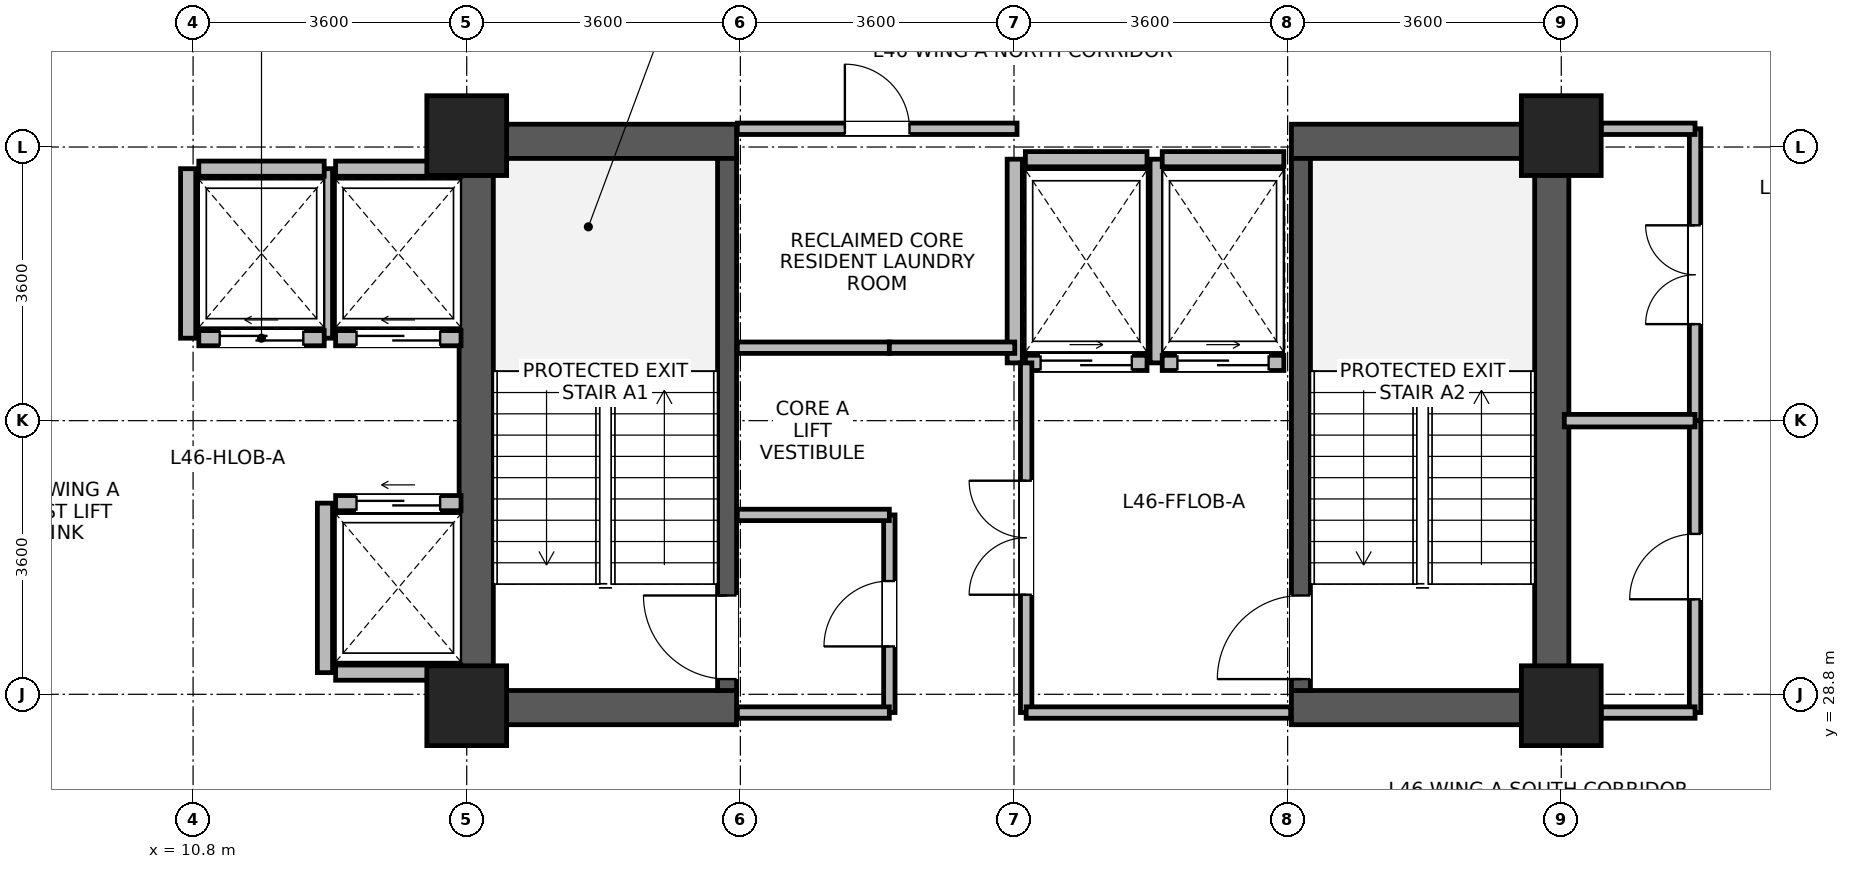
"""IFC4 building model, lengths in metres.
Left out: names, types, materials, properties, quantities, classifications, styles, units other than length and angle.
Written with IfcOpenShell. Run it as: python <this file> out.ifc"""

import sys

from ifc_helpers import new_model, si_unit, direction, frame, frame_2d, origin, origin_2d, place, context, subcontext, project, spatial, rectangle, extrude, source, transform, mapped, element, fill, save


model = new_model("IFC4")
c1 = context("Model", 3, precision=1e-05, world=origin(), true_north=direction((0.0, 1.0)))
c2 = subcontext(c1, "Body", "Model", "MODEL_VIEW")
j1 = project(units=[si_unit("LENGTHUNIT", "METRE"), si_unit("PLANEANGLEUNIT", "RADIAN")], contexts=[c1])
p1 = place(None, origin())
s1 = spatial("IfcSite", under=j1, at=p1, CompositionType="ELEMENT")
p2 = place(p1, origin())
s2 = spatial("IfcBuilding", under=s1, at=p2, CompositionType="ELEMENT")
p3 = place(p2, frame((0.0, 0.0, 180.9)))
s3 = spatial("IfcBuildingStorey", under=s2, at=p3, CompositionType="ELEMENT", Elevation=180.9)
for number, where, z_axis, x_axis in (
    (1, (14.525, 28.4, 0.0), (0.0, 0.0, 1.0), (0.0, 1.0, 0.0)),
    (2, (28.675, 28.4, 0.0), (0.0, 0.0, 1.0), (0.0, 1.0, 0.0)),
):
    element("IfcWall", number, at=place(p3, frame(where, z_axis=z_axis, x_axis=x_axis)), inside=s3, PredefinedType="SHEAR", context=c2, shape_type="SweptSolid", body=[
        extrude(rectangle(XDim=7.9, YDim=0.45, at=frame_2d((3.95, 0.0))), origin(), (0.0, 0.0, 1.0), 3.46),
    ])
for number, where, z_axis, x_axis in (
    (3, (14.75, 28.625, 0.0), (0.0, 0.0, 1.0), (1.0, 0.0, 0.0)),
    (4, (25.25, 28.625, 0.0), (0.0, 0.0, 1.0), (1.0, 0.0, 0.0)),
    (5, (14.75, 36.075, 0.0), (0.0, 0.0, 1.0), (1.0, 0.0, 0.0)),
    (6, (25.25, 36.075, 0.0), (0.0, 0.0, 1.0), (1.0, 0.0, 0.0)),
):
    element("IfcWall", number, at=place(p3, frame(where, z_axis=z_axis, x_axis=x_axis)), inside=s3, PredefinedType="SHEAR", context=c2, shape_type="SweptSolid", body=[
        extrude(rectangle(XDim=3.2, YDim=0.45, at=frame_2d((1.6, 0.0))), origin(), (0.0, 0.0, 1.0), 3.46),
    ])
p4 = place(p3, frame((17.825, 28.85, 0.0), z_axis=(0.0, 0.0, 1.0), x_axis=(0.0, 1.0, 0.0)))
e7 = element("IfcWall", 7, at=p4, inside=s3, PredefinedType="SHEAR", context=c2, shape_type="SweptSolid", body=[
    extrude(rectangle(XDim=7.0, YDim=0.25, at=frame_2d((3.5, 0.0))), origin(), (0.0, 0.0, 1.0), 3.46),
])
p5 = place(p4, frame((0.15, 0.0, 0.0)))
e8 = element("IfcOpeningElement", 8, at=p5, cuts=e7, PredefinedType="OPENING", context=c2, shape_type="SweptSolid", body=[
    extrude(rectangle(XDim=1.1, YDim=2.08, at=frame_2d((0.55, 1.04))), frame((0.0, 0.135, 0.0), z_axis=(0.0, -1.0, 0.0), x_axis=(1.0, 0.0, 0.0)), (0.0, 0.0, 1.0), 0.27),
])
p6 = place(p3, frame((25.375, 28.85, 0.0), z_axis=(0.0, 0.0, 1.0), x_axis=(0.0, 1.0, 0.0)))
e9 = element("IfcWall", 9, at=p6, inside=s3, PredefinedType="SHEAR", context=c2, shape_type="SweptSolid", body=[
    extrude(rectangle(XDim=7.0, YDim=0.25, at=frame_2d((3.5, 0.0))), origin(), (0.0, 0.0, 1.0), 3.46),
])
p7 = place(p6, frame((0.15, 0.0, 0.0)))
e10 = element("IfcOpeningElement", 10, at=p7, cuts=e9, PredefinedType="OPENING", context=c2, shape_type="SweptSolid", body=[
    extrude(rectangle(XDim=1.1, YDim=2.08, at=frame_2d((0.55, 1.04))), frame((0.0, 0.135, 0.0), z_axis=(0.0, -1.0, 0.0), x_axis=(1.0, 0.0, 0.0)), (0.0, 0.0, 1.0), 0.27),
])
m1 = source(origin(), c2, "Body", "SweptSolid", [
    extrude(rectangle(XDim=1.05, YDim=1.05, at=origin_2d()), origin(), (0.0, 0.0, 1.0), 3.7),
])
for number, where, z_axis, x_axis in (
    (11, (14.4, 28.65, 0.0), (0.0, 0.0, 1.0), (1.0, 0.0, 0.0)),
    (12, (14.4, 36.15, 0.0), (0.0, 0.0, 1.0), (1.0, 0.0, 0.0)),
    (13, (28.8, 28.65, 0.0), (0.0, 0.0, 1.0), (1.0, 0.0, 0.0)),
    (14, (28.8, 36.15, 0.0), (0.0, 0.0, 1.0), (1.0, 0.0, 0.0)),
):
    element("IfcColumn", number, at=place(p3, frame(where, z_axis=z_axis, x_axis=x_axis)), inside=s3, PredefinedType="COLUMN", context=c2, shape_type="MappedRepresentation", body=[
        mapped(m1, transform((0.0, 0.0, 0.0), x_axis=(1.0, 0.0, 0.0), y_axis=(0.0, 1.0, 0.0), z_axis=(0.0, 0.0, 1.0), scale=1.0)),
    ])
p8 = place(p3, frame((12.675, 33.485, 0.0), z_axis=(0.0, 0.0, 1.0), x_axis=(1.0, 0.0, 0.0)))
e15 = element("IfcWall", 15, at=p8, inside=s3, PredefinedType="PARTITIONING", context=c2, shape_type="SweptSolid", body=[
    extrude(rectangle(XDim=1.65, YDim=0.2, at=frame_2d((0.825, 0.0))), origin(), (0.0, 0.0, 1.0), 3.44),
])
p9 = place(p8, frame((0.275, 0.0, 0.0)))
e16 = element("IfcOpeningElement", 16, at=p9, cuts=e15, PredefinedType="OPENING", context=c2, shape_type="SweptSolid", body=[
    extrude(rectangle(XDim=1.1, YDim=2.12, at=frame_2d((0.55, 1.06))), frame((0.0, 0.11, 0.0), z_axis=(0.0, -1.0, 0.0), x_axis=(1.0, 0.0, 0.0)), (0.0, 0.0, 1.0), 0.22),
])
p10 = place(p3, frame((12.675, 35.715, 0.0), z_axis=(0.0, 0.0, 1.0), x_axis=(1.0, 0.0, 0.0)))
e17 = element("IfcWall", 17, at=p10, inside=s3, PredefinedType="PARTITIONING", context=c2, shape_type="SweptSolid", body=[
    extrude(rectangle(XDim=1.65, YDim=0.2, at=frame_2d((0.825, 0.0))), origin(), (0.0, 0.0, 1.0), 3.44),
])
p11 = place(p3, frame((12.535, 33.485, 0.0), z_axis=(0.0, 0.0, 1.0), x_axis=(0.0, 1.0, 0.0)))
e18 = element("IfcWall", 18, at=p11, inside=s3, PredefinedType="PARTITIONING", context=c2, shape_type="SweptSolid", body=[
    extrude(rectangle(XDim=2.23, YDim=0.2, at=frame_2d((1.115, 0.0))), origin(), (0.0, 0.0, 1.0), 3.44),
])
p12 = place(p3, frame((12.675, 29.085, 0.0), z_axis=(0.0, 0.0, 1.0), x_axis=(1.0, 0.0, 0.0)))
e19 = element("IfcWall", 19, at=p12, inside=s3, PredefinedType="PARTITIONING", context=c2, shape_type="SweptSolid", body=[
    extrude(rectangle(XDim=1.65, YDim=0.2, at=frame_2d((0.825, 0.0))), origin(), (0.0, 0.0, 1.0), 3.44),
])
p13 = place(p3, frame((12.675, 31.315, 0.0), z_axis=(0.0, 0.0, 1.0), x_axis=(1.0, 0.0, 0.0)))
e20 = element("IfcWall", 20, at=p13, inside=s3, PredefinedType="PARTITIONING", context=c2, shape_type="SweptSolid", body=[
    extrude(rectangle(XDim=1.65, YDim=0.2, at=frame_2d((0.825, 0.0))), origin(), (0.0, 0.0, 1.0), 3.44),
])
p14 = place(p13, frame((0.275, 0.0, 0.0)))
e21 = element("IfcOpeningElement", 21, at=p14, cuts=e20, PredefinedType="OPENING", context=c2, shape_type="SweptSolid", body=[
    extrude(rectangle(XDim=1.1, YDim=2.12, at=frame_2d((0.55, 1.06))), frame((0.0, 0.11, 0.0), z_axis=(0.0, -1.0, 0.0), x_axis=(1.0, 0.0, 0.0)), (0.0, 0.0, 1.0), 0.22),
])
p15 = place(p3, frame((12.535, 29.085, 0.0), z_axis=(0.0, 0.0, 1.0), x_axis=(0.0, 1.0, 0.0)))
e22 = element("IfcWall", 22, at=p15, inside=s3, PredefinedType="PARTITIONING", context=c2, shape_type="SweptSolid", body=[
    extrude(rectangle(XDim=2.23, YDim=0.2, at=frame_2d((1.115, 0.0))), origin(), (0.0, 0.0, 1.0), 3.44),
])
p16 = place(p3, frame((10.875, 33.485, 0.0), z_axis=(0.0, 0.0, 1.0), x_axis=(1.0, 0.0, 0.0)))
e23 = element("IfcWall", 23, at=p16, inside=s3, PredefinedType="PARTITIONING", context=c2, shape_type="SweptSolid", body=[
    extrude(rectangle(XDim=1.65, YDim=0.2, at=frame_2d((0.825, 0.0))), origin(), (0.0, 0.0, 1.0), 3.44),
])
p17 = place(p16, frame((0.275, 0.0, 0.0)))
e24 = element("IfcOpeningElement", 24, at=p17, cuts=e23, PredefinedType="OPENING", context=c2, shape_type="SweptSolid", body=[
    extrude(rectangle(XDim=1.1, YDim=2.12, at=frame_2d((0.55, 1.06))), frame((0.0, 0.11, 0.0), z_axis=(0.0, -1.0, 0.0), x_axis=(1.0, 0.0, 0.0)), (0.0, 0.0, 1.0), 0.22),
])
p18 = place(p3, frame((10.875, 35.715, 0.0), z_axis=(0.0, 0.0, 1.0), x_axis=(1.0, 0.0, 0.0)))
e25 = element("IfcWall", 25, at=p18, inside=s3, PredefinedType="PARTITIONING", context=c2, shape_type="SweptSolid", body=[
    extrude(rectangle(XDim=1.65, YDim=0.2, at=frame_2d((0.825, 0.0))), origin(), (0.0, 0.0, 1.0), 3.44),
])
p19 = place(p3, frame((10.735, 33.485, 0.0), z_axis=(0.0, 0.0, 1.0), x_axis=(0.0, 1.0, 0.0)))
e26 = element("IfcWall", 26, at=p19, inside=s3, PredefinedType="PARTITIONING", context=c2, shape_type="SweptSolid", body=[
    extrude(rectangle(XDim=2.23, YDim=0.2, at=frame_2d((1.115, 0.0))), origin(), (0.0, 0.0, 1.0), 3.44),
])
p20 = place(p3, frame((21.75, 33.16, 0.0), z_axis=(0.0, 0.0, 1.0), x_axis=(1.0, 0.0, 0.0)))
e27 = element("IfcWall", 27, at=p20, inside=s3, PredefinedType="PARTITIONING", context=c2, shape_type="SweptSolid", body=[
    extrude(rectangle(XDim=1.6, YDim=0.2, at=frame_2d((0.8, 0.0))), origin(), (0.0, 0.0, 1.0), 3.44),
])
p21 = place(p20, frame((0.2, 0.0, 0.0)))
e28 = element("IfcOpeningElement", 28, at=p21, cuts=e27, PredefinedType="OPENING", context=c2, shape_type="SweptSolid", body=[
    extrude(rectangle(XDim=1.2, YDim=2.12, at=frame_2d((0.6, 1.06))), frame((0.0, 0.11, 0.0), z_axis=(0.0, -1.0, 0.0), x_axis=(1.0, 0.0, 0.0)), (0.0, 0.0, 1.0), 0.22),
])
p22 = place(p3, frame((21.75, 35.84, 0.0), z_axis=(0.0, 0.0, 1.0), x_axis=(1.0, 0.0, 0.0)))
e29 = element("IfcWall", 29, at=p22, inside=s3, PredefinedType="PARTITIONING", context=c2, shape_type="SweptSolid", body=[
    extrude(rectangle(XDim=1.6, YDim=0.2, at=frame_2d((0.8, 0.0))), origin(), (0.0, 0.0, 1.0), 2.44),
])
for number, where, z_axis, x_axis in (
    (30, (21.61, 33.16, 0.0), (0.0, 0.0, 1.0), (0.0, 1.0, 0.0)),
    (31, (23.49, 33.16, 0.0), (0.0, 0.0, 1.0), (0.0, 1.0, 0.0)),
):
    element("IfcWall", number, at=place(p3, frame(where, z_axis=z_axis, x_axis=x_axis)), inside=s3, PredefinedType="PARTITIONING", context=c2, shape_type="SweptSolid", body=[
        extrude(rectangle(XDim=2.68, YDim=0.2, at=frame_2d((1.34, 0.0))), origin(), (0.0, 0.0, 1.0), 3.44),
    ])
p23 = place(p3, frame((23.55, 33.16, 0.0), z_axis=(0.0, 0.0, 1.0), x_axis=(1.0, 0.0, 0.0)))
e32 = element("IfcWall", 32, at=p23, inside=s3, PredefinedType="PARTITIONING", context=c2, shape_type="SweptSolid", body=[
    extrude(rectangle(XDim=1.6, YDim=0.2, at=frame_2d((0.8, 0.0))), origin(), (0.0, 0.0, 1.0), 3.44),
])
p24 = place(p23, frame((0.2, 0.0, 0.0)))
e33 = element("IfcOpeningElement", 33, at=p24, cuts=e32, PredefinedType="OPENING", context=c2, shape_type="SweptSolid", body=[
    extrude(rectangle(XDim=1.2, YDim=2.12, at=frame_2d((0.6, 1.06))), frame((0.0, 0.11, 0.0), z_axis=(0.0, -1.0, 0.0), x_axis=(1.0, 0.0, 0.0)), (0.0, 0.0, 1.0), 0.22),
])
p25 = place(p3, frame((23.55, 35.84, 0.0), z_axis=(0.0, 0.0, 1.0), x_axis=(1.0, 0.0, 0.0)))
e34 = element("IfcWall", 34, at=p25, inside=s3, PredefinedType="PARTITIONING", context=c2, shape_type="SweptSolid", body=[
    extrude(rectangle(XDim=1.6, YDim=0.2, at=frame_2d((0.8, 0.0))), origin(), (0.0, 0.0, 1.0), 2.44),
])
p26 = place(p3, frame((30.56, 32.4, 0.0), z_axis=(0.0, 0.0, 1.0), x_axis=(0.0, 1.0, 0.0)))
e35 = element("IfcWall", 35, at=p26, inside=s3, PredefinedType="PARTITIONING", context=c2, shape_type="SweptSolid", body=[
    extrude(rectangle(XDim=3.84, YDim=0.15, at=frame_2d((1.92, 0.0))), origin(), (0.0, 0.0, 1.0), 3.44),
])
p27 = place(p26, frame((1.27, 0.0, 0.0)))
e36 = element("IfcOpeningElement", 36, at=p27, cuts=e35, PredefinedType="OPENING", context=c2, shape_type="SweptSolid", body=[
    extrude(rectangle(XDim=1.3, YDim=2.12, at=frame_2d((0.65, 1.06))), frame((0.0, 0.085, 0.0), z_axis=(0.0, -1.0, 0.0), x_axis=(1.0, 0.0, 0.0)), (0.0, 0.0, 1.0), 0.17),
])
p28 = place(p3, frame((30.56, 28.56, 0.0), z_axis=(0.0, 0.0, 1.0), x_axis=(0.0, 1.0, 0.0)))
e37 = element("IfcWall", 37, at=p28, inside=s3, PredefinedType="PARTITIONING", context=c2, shape_type="SweptSolid", body=[
    extrude(rectangle(XDim=3.84, YDim=0.15, at=frame_2d((1.92, 0.0))), origin(), (0.0, 0.0, 1.0), 3.44),
])
p29 = place(p28, frame((1.49, 0.0, 0.0)))
e38 = element("IfcOpeningElement", 38, at=p29, cuts=e37, PredefinedType="OPENING", context=c2, shape_type="SweptSolid", body=[
    extrude(rectangle(XDim=0.86, YDim=2.02, at=frame_2d((0.43, 1.01))), frame((0.0, 0.085, 0.0), z_axis=(0.0, -1.0, 0.0), x_axis=(1.0, 0.0, 0.0)), (0.0, 0.0, 1.0), 0.17),
])
p30 = place(p3, frame((17.96, 36.24, 0.0), z_axis=(0.0, 0.0, 1.0), x_axis=(1.0, 0.0, 0.0)))
e39 = element("IfcWall", 39, at=p30, inside=s3, PredefinedType="PARTITIONING", context=c2, shape_type="SweptSolid", body=[
    extrude(rectangle(XDim=3.68, YDim=0.15, at=frame_2d((1.84, 0.0))), origin(), (0.0, 0.0, 1.0), 2.44),
])
p31 = place(p30, frame((1.415, 0.0, 0.0)))
e40 = element("IfcOpeningElement", 40, at=p31, cuts=e39, PredefinedType="OPENING", context=c2, shape_type="SweptSolid", body=[
    extrude(rectangle(XDim=0.85, YDim=2.04, at=frame_2d((0.425, 1.02))), frame((0.0, 0.085, 0.0), z_axis=(0.0, -1.0, 0.0), x_axis=(1.0, 0.0, 0.0)), (0.0, 0.0, 1.0), 0.17),
])
p32 = place(p3, frame((19.96, 28.56, 0.0), z_axis=(0.0, 0.0, 1.0), x_axis=(0.0, 1.0, 0.0)))
e41 = element("IfcWall", 41, at=p32, inside=s3, PredefinedType="PARTITIONING", context=c2, shape_type="SweptSolid", body=[
    extrude(rectangle(XDim=2.6, YDim=0.15, at=frame_2d((1.3, 0.0))), origin(), (0.0, 0.0, 1.0), 3.44),
])
p33 = place(p32, frame((0.87, 0.0, 0.0)))
e42 = element("IfcOpeningElement", 42, at=p33, cuts=e41, PredefinedType="OPENING", context=c2, shape_type="SweptSolid", body=[
    extrude(rectangle(XDim=0.86, YDim=2.02, at=frame_2d((0.43, 1.01))), frame((0.0, 0.085, 0.0), z_axis=(0.0, -1.0, 0.0), x_axis=(1.0, 0.0, 0.0)), (0.0, 0.0, 1.0), 0.17),
])
p34 = place(p3, frame((17.96, 28.56, 0.0), z_axis=(0.0, 0.0, 1.0), x_axis=(1.0, 0.0, 0.0)))
e43 = element("IfcWall", 43, at=p34, inside=s3, PredefinedType="PARTITIONING", context=c2, shape_type="SweptSolid", body=[
    extrude(rectangle(XDim=2.0, YDim=0.15, at=frame_2d((1.0, 0.0))), origin(), (0.0, 0.0, 1.0), 2.44),
])
for number, where, z_axis, x_axis in (
    (44, (17.96, 31.16, 0.0), (0.0, 0.0, 1.0), (1.0, 0.0, 0.0)),
    (45, (17.96, 33.36, 0.0), (0.0, 0.0, 1.0), (1.0, 0.0, 0.0)),
):
    element("IfcWall", number, at=place(p3, frame(where, z_axis=z_axis, x_axis=x_axis)), inside=s3, PredefinedType="PARTITIONING", context=c2, shape_type="SweptSolid", body=[
        extrude(rectangle(XDim=2.0, YDim=0.15, at=frame_2d((1.0, 0.0))), origin(), (0.0, 0.0, 1.0), 3.44),
    ])
for number, where, z_axis, x_axis in (
    (46, (29.325, 28.56, 0.0), (0.0, 0.0, 1.0), (1.0, 0.0, 0.0)),
    (47, (29.325, 36.24, 0.0), (0.0, 0.0, 1.0), (1.0, 0.0, 0.0)),
):
    element("IfcWall", number, at=place(p3, frame(where, z_axis=z_axis, x_axis=x_axis)), inside=s3, PredefinedType="PARTITIONING", context=c2, shape_type="SweptSolid", body=[
        extrude(rectangle(XDim=1.235, YDim=0.15, at=frame_2d((0.618, 0.0))), origin(), (0.0, 0.0, 1.0), 2.84),
    ])
p35 = place(p3, frame((19.96, 33.36, 0.0), z_axis=(0.0, 0.0, 1.0), x_axis=(1.0, 0.0, 0.0)))
e48 = element("IfcWall", 48, at=p35, inside=s3, PredefinedType="PARTITIONING", context=c2, shape_type="SweptSolid", body=[
    extrude(rectangle(XDim=1.65, YDim=0.15, at=frame_2d((0.825, 0.0))), origin(), (0.0, 0.0, 1.0), 3.44),
])
p36 = place(p3, frame((21.76, 28.56, 0.0), z_axis=(0.0, 0.0, 1.0), x_axis=(0.0, 1.0, 0.0)))
e49 = element("IfcWall", 49, at=p36, inside=s3, PredefinedType="PARTITIONING", context=c2, shape_type="SweptSolid", body=[
    extrude(rectangle(XDim=4.6, YDim=0.15, at=frame_2d((2.3, 0.0))), origin(), (0.0, 0.0, 1.0), 3.44),
])
p37 = place(p36, frame((1.55, 0.0, 0.0)))
e50 = element("IfcOpeningElement", 50, at=p37, cuts=e49, PredefinedType="OPENING", context=c2, shape_type="SweptSolid", body=[
    extrude(rectangle(XDim=1.5, YDim=2.1, at=frame_2d((0.75, 1.05))), frame((0.0, 0.085, 0.0), z_axis=(0.0, -1.0, 0.0), x_axis=(1.0, 0.0, 0.0)), (0.0, 0.0, 1.0), 0.17),
])
p38 = place(p3, frame((21.76, 28.56, 0.0), z_axis=(0.0, 0.0, 1.0), x_axis=(1.0, 0.0, 0.0)))
e51 = element("IfcWall", 51, at=p38, inside=s3, PredefinedType="PARTITIONING", context=c2, shape_type="SweptSolid", body=[
    extrude(rectangle(XDim=3.48, YDim=0.15, at=frame_2d((1.74, 0.0))), origin(), (0.0, 0.0, 1.0), 2.44),
])
p39 = place(p3, frame((28.84, 32.4, 0.0), z_axis=(0.0, 0.0, 1.0), x_axis=(1.0, 0.0, 0.0)))
e52 = element("IfcWall", 52, at=p39, inside=s3, PredefinedType="PARTITIONING", context=c2, shape_type="SweptSolid", body=[
    extrude(rectangle(XDim=1.72, YDim=0.165, at=frame_2d((0.86, 0.0))), origin(), (0.0, 0.0, 1.0), 3.44),
])
p40 = place(p5, origin())
e53 = element("IfcDoor", 53, at=p40, inside=s3, OperationType="SINGLE_SWING_RIGHT", PredefinedType="DOOR", context=c2, shape_type="SweptSolid", body=[
    extrude(rectangle(XDim=1.1, YDim=2.08, at=frame_2d((0.55, 1.04))), frame((0.0, 0.025, 0.0), z_axis=(0.0, -1.0, 0.0), x_axis=(1.0, 0.0, 0.0)), (0.0, 0.0, 1.0), 0.05),
])
fill(e8, e53)
p41 = place(p7, origin())
e54 = element("IfcDoor", 54, at=p41, inside=s3, OperationType="SINGLE_SWING_LEFT", PredefinedType="DOOR", context=c2, shape_type="SweptSolid", body=[
    extrude(rectangle(XDim=1.1, YDim=2.08, at=frame_2d((0.55, 1.04))), frame((0.0, 0.025, 0.0), z_axis=(0.0, -1.0, 0.0), x_axis=(1.0, 0.0, 0.0)), (0.0, 0.0, 1.0), 0.05),
])
fill(e10, e54)
p42 = place(p9, origin())
e55 = element("IfcDoor", 55, at=p42, inside=s3, OperationType="SLIDING_TO_LEFT", PredefinedType="DOOR", context=c2, shape_type="SweptSolid", body=[
    extrude(rectangle(XDim=1.1, YDim=2.12, at=frame_2d((0.55, 1.06))), frame((0.0, 0.025, 0.0), z_axis=(0.0, -1.0, 0.0), x_axis=(1.0, 0.0, 0.0)), (0.0, 0.0, 1.0), 0.05),
])
fill(e16, e55)
p43 = place(p14, origin())
e56 = element("IfcDoor", 56, at=p43, inside=s3, OperationType="SLIDING_TO_LEFT", PredefinedType="DOOR", context=c2, shape_type="SweptSolid", body=[
    extrude(rectangle(XDim=1.1, YDim=2.12, at=frame_2d((0.55, 1.06))), frame((0.0, 0.025, 0.0), z_axis=(0.0, -1.0, 0.0), x_axis=(1.0, 0.0, 0.0)), (0.0, 0.0, 1.0), 0.05),
])
fill(e21, e56)
p44 = place(p17, origin())
e57 = element("IfcDoor", 57, at=p44, inside=s3, OperationType="SLIDING_TO_LEFT", PredefinedType="DOOR", context=c2, shape_type="SweptSolid", body=[
    extrude(rectangle(XDim=1.1, YDim=2.12, at=frame_2d((0.55, 1.06))), frame((0.0, 0.025, 0.0), z_axis=(0.0, -1.0, 0.0), x_axis=(1.0, 0.0, 0.0)), (0.0, 0.0, 1.0), 0.05),
])
fill(e24, e57)
p45 = place(p21, origin())
e58 = element("IfcDoor", 58, at=p45, inside=s3, OperationType="SLIDING_TO_RIGHT", PredefinedType="DOOR", context=c2, shape_type="SweptSolid", body=[
    extrude(rectangle(XDim=1.2, YDim=2.12, at=frame_2d((0.6, 1.06))), frame((0.0, 0.025, 0.0), z_axis=(0.0, -1.0, 0.0), x_axis=(1.0, 0.0, 0.0)), (0.0, 0.0, 1.0), 0.05),
])
fill(e28, e58)
p46 = place(p24, origin())
e59 = element("IfcDoor", 59, at=p46, inside=s3, OperationType="SLIDING_TO_RIGHT", PredefinedType="DOOR", context=c2, shape_type="SweptSolid", body=[
    extrude(rectangle(XDim=1.2, YDim=2.12, at=frame_2d((0.6, 1.06))), frame((0.0, 0.025, 0.0), z_axis=(0.0, -1.0, 0.0), x_axis=(1.0, 0.0, 0.0)), (0.0, 0.0, 1.0), 0.05),
])
fill(e33, e59)
p47 = place(p27, origin())
e60 = element("IfcDoor", 60, at=p47, inside=s3, OperationType="DOUBLE_DOOR_SINGLE_SWING", PredefinedType="DOOR", context=c2, shape_type="SweptSolid", body=[
    extrude(rectangle(XDim=1.3, YDim=2.12, at=frame_2d((0.65, 1.06))), frame((0.0, 0.025, 0.0), z_axis=(0.0, -1.0, 0.0), x_axis=(1.0, 0.0, 0.0)), (0.0, 0.0, 1.0), 0.05),
])
fill(e36, e60)
p48 = place(p29, origin())
e61 = element("IfcDoor", 61, at=p48, inside=s3, OperationType="SINGLE_SWING_LEFT", PredefinedType="DOOR", context=c2, shape_type="SweptSolid", body=[
    extrude(rectangle(XDim=0.86, YDim=2.02, at=frame_2d((0.43, 1.01))), frame((0.0, 0.025, 0.0), z_axis=(0.0, -1.0, 0.0), x_axis=(1.0, 0.0, 0.0)), (0.0, 0.0, 1.0), 0.05),
])
fill(e38, e61)
p49 = place(p31, origin())
e62 = element("IfcDoor", 62, at=p49, inside=s3, OperationType="SINGLE_SWING_LEFT", PredefinedType="DOOR", context=c2, shape_type="SweptSolid", body=[
    extrude(rectangle(XDim=0.85, YDim=2.04, at=frame_2d((0.425, 1.02))), frame((0.0, 0.025, 0.0), z_axis=(0.0, -1.0, 0.0), x_axis=(1.0, 0.0, 0.0)), (0.0, 0.0, 1.0), 0.05),
])
fill(e40, e62)
p50 = place(p33, origin())
e63 = element("IfcDoor", 63, at=p50, inside=s3, OperationType="SINGLE_SWING_LEFT", PredefinedType="DOOR", context=c2, shape_type="SweptSolid", body=[
    extrude(rectangle(XDim=0.86, YDim=2.02, at=frame_2d((0.43, 1.01))), frame((0.0, 0.025, 0.0), z_axis=(0.0, -1.0, 0.0), x_axis=(1.0, 0.0, 0.0)), (0.0, 0.0, 1.0), 0.05),
])
fill(e42, e63)
p51 = place(p37, origin())
e64 = element("IfcDoor", 64, at=p51, inside=s3, OperationType="DOUBLE_DOOR_SINGLE_SWING", PredefinedType="DOOR", context=c2, shape_type="SweptSolid", body=[
    extrude(rectangle(XDim=1.5, YDim=2.1, at=frame_2d((0.75, 1.05))), frame((0.0, 0.025, 0.0), z_axis=(0.0, -1.0, 0.0), x_axis=(1.0, 0.0, 0.0)), (0.0, 0.0, 1.0), 0.05),
])
fill(e50, e64)
save(model, sys.argv[1])
